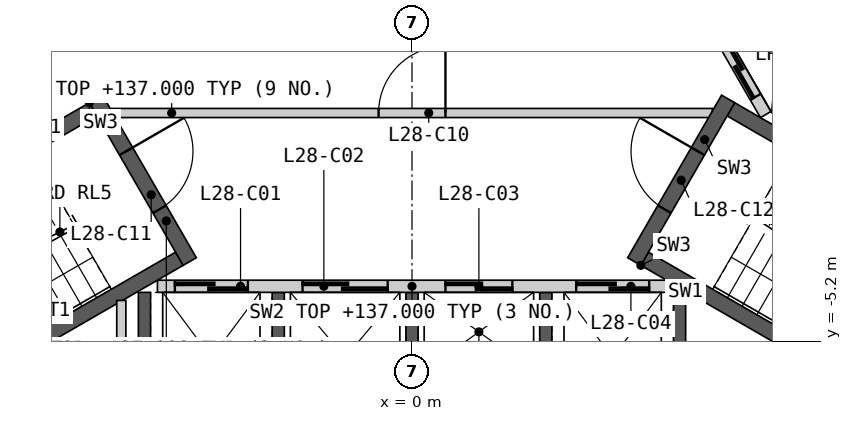
"""IFC4 building model, lengths in metres.
Left out: names, types, materials, properties, quantities, classifications, styles, units other than length and angle.
Written with IfcOpenShell. Run it as: python <this file> out.ifc"""

import sys

from ifc_helpers import new_model, si_unit, direction, frame, frame_2d, origin, place, context, subcontext, project, spatial, polyline, rectangle, outline, extrude, element, fill, save


model = new_model("IFC4")
c1 = context("Model", 3, precision=1e-05, world=origin(), true_north=direction((0.0, 1.0)))
c2 = subcontext(c1, "Body", "Model", "MODEL_VIEW")
j1 = project(units=[si_unit("LENGTHUNIT", "METRE"), si_unit("PLANEANGLEUNIT", "RADIAN")], contexts=[c1])
p1 = place(None, origin())
s1 = spatial("IfcSite", under=j1, at=p1, CompositionType="ELEMENT")
p2 = place(p1, origin())
s2 = spatial("IfcBuilding", under=s1, at=p2, CompositionType="ELEMENT")
p3 = place(p2, frame((0.0, 0.0, 133.2)))
s3 = spatial("IfcBuildingStorey", under=s2, at=p3, CompositionType="ELEMENT", Elevation=133.2)
p4 = place(p3, origin())
e1 = element("IfcWall", 1, at=p4, inside=s3, PredefinedType="SHEAR", context=c2, shape_type="SweptSolid", body=[
    extrude(outline(polyline([(4.5, -4.4), (4.5, -6.906), (-4.5, -6.906), (-4.5, -4.4), (-4.3, -4.4), (-4.3, -6.7), (-2.3, -6.7), (-2.3, -4.4), (-2.1, -4.4), (-2.1, -6.7), (-0.1, -6.7), (-0.1, -4.4), (0.1, -4.4), (0.1, -6.7), (2.1, -6.7), (2.1, -4.4), (2.3, -4.4), (2.3, -6.7), (4.3, -6.7), (4.3, -4.4), (4.5, -4.4)])), origin(), (0.0, 0.0, 1.0), 3.8),
])
p5 = place(p3, frame((-4.187, -4.3, 0.0), z_axis=(0.0, 0.0, 1.0), x_axis=(1.0, 0.0, 0.0)))
e2 = element("IfcWall", 2, at=p5, inside=s3, PredefinedType="SOLIDWALL", context=c2, shape_type="SweptSolid", body=[
    extrude(rectangle(XDim=8.373, YDim=0.2, at=frame_2d((4.187, 0.0))), origin(), (0.0, 0.0, 1.0), 3.8),
])
p6 = place(p5, frame((0.287, 0.0, 0.0)))
e3 = element("IfcOpeningElement", 3, at=p6, cuts=e2, PredefinedType="OPENING", context=c2, shape_type="SweptSolid", body=[
    extrude(rectangle(XDim=1.2, YDim=2.1, at=frame_2d((0.6, 1.05))), frame((0.0, 0.11, 0.0), z_axis=(0.0, -1.0, 0.0), x_axis=(1.0, 0.0, 0.0)), (0.0, 0.0, 1.0), 0.22),
])
p7 = place(p5, frame((2.387, 0.0, 0.0)))
e4 = element("IfcOpeningElement", 4, at=p7, cuts=e2, PredefinedType="OPENING", context=c2, shape_type="SweptSolid", body=[
    extrude(rectangle(XDim=1.4, YDim=2.1, at=frame_2d((0.7, 1.05))), frame((0.0, 0.11, 0.0), z_axis=(0.0, -1.0, 0.0), x_axis=(1.0, 0.0, 0.0)), (0.0, 0.0, 1.0), 0.22),
])
p8 = place(p5, frame((4.737, 0.0, 0.0)))
e5 = element("IfcOpeningElement", 5, at=p8, cuts=e2, PredefinedType="OPENING", context=c2, shape_type="SweptSolid", body=[
    extrude(rectangle(XDim=1.1, YDim=2.1, at=frame_2d((0.55, 1.05))), frame((0.0, 0.11, 0.0), z_axis=(0.0, -1.0, 0.0), x_axis=(1.0, 0.0, 0.0)), (0.0, 0.0, 1.0), 0.22),
])
p9 = place(p5, frame((6.887, 0.0, 0.0)))
e6 = element("IfcOpeningElement", 6, at=p9, cuts=e2, PredefinedType="OPENING", context=c2, shape_type="SweptSolid", body=[
    extrude(rectangle(XDim=1.2, YDim=2.1, at=frame_2d((0.6, 1.05))), frame((0.0, 0.11, 0.0), z_axis=(0.0, -1.0, 0.0), x_axis=(1.0, 0.0, 0.0)), (0.0, 0.0, 1.0), 0.22),
])
p10 = place(p3, origin())
e7 = element("IfcWall", 7, at=p10, inside=s3, PredefinedType="SHEAR", context=c2, shape_type="SweptSolid", body=[
    extrude(outline(polyline([(2.66, 4.192), (4.831, 5.445), (8.231, -0.444), (6.061, -1.697), (5.96, -1.524), (7.952, -0.374), (6.952, 1.358), (4.96, 0.208), (4.861, 0.381), (6.852, 1.531), (5.852, 3.263), (3.861, 2.113), (3.76, 2.287), (5.752, 3.437), (4.752, 5.169), (2.76, 4.019), (2.66, 4.192)])), origin(), (0.0, 0.0, 1.0), 3.8),
])
p11 = place(p3, frame((5.817, -1.476, 0.0), z_axis=(0.0, 0.0, 1.0), x_axis=(-0.500002616675, 0.866023893041, 0.0)))
e8 = element("IfcWall", 8, at=p11, inside=s3, PredefinedType="SOLIDWALL", context=c2, shape_type="SweptSolid", body=[
    extrude(rectangle(XDim=8.373, YDim=0.2, at=frame_2d((4.187, 0.0))), origin(), (0.0, 0.0, 1.0), 3.8),
])
p12 = place(p11, frame((0.337, 0.0, 0.0)))
e9 = element("IfcOpeningElement", 9, at=p12, cuts=e8, PredefinedType="OPENING", context=c2, shape_type="SweptSolid", body=[
    extrude(rectangle(XDim=1.1, YDim=2.1, at=frame_2d((0.55, 1.05))), frame((0.0, 0.11, 0.0), z_axis=(0.0, -1.0, 0.0), x_axis=(1.0, 0.0, 0.0)), (0.0, 0.0, 1.0), 0.22),
])
p13 = place(p11, frame((2.537, 0.0, 0.0)))
e10 = element("IfcOpeningElement", 10, at=p13, cuts=e8, PredefinedType="OPENING", context=c2, shape_type="SweptSolid", body=[
    extrude(rectangle(XDim=1.1, YDim=2.1, at=frame_2d((0.55, 1.05))), frame((0.0, 0.11, 0.0), z_axis=(0.0, -1.0, 0.0), x_axis=(1.0, 0.0, 0.0)), (0.0, 0.0, 1.0), 0.22),
])
p14 = place(p11, frame((4.737, 0.0, 0.0)))
e11 = element("IfcOpeningElement", 11, at=p14, cuts=e8, PredefinedType="OPENING", context=c2, shape_type="SweptSolid", body=[
    extrude(rectangle(XDim=1.1, YDim=2.1, at=frame_2d((0.55, 1.05))), frame((0.0, 0.11, 0.0), z_axis=(0.0, -1.0, 0.0), x_axis=(1.0, 0.0, 0.0)), (0.0, 0.0, 1.0), 0.22),
])
p15 = place(p11, frame((7.037, 0.0, 0.0)))
e12 = element("IfcOpeningElement", 12, at=p15, cuts=e8, PredefinedType="OPENING", context=c2, shape_type="SweptSolid", body=[
    extrude(rectangle(XDim=0.9, YDim=2.1, at=frame_2d((0.45, 1.05))), frame((0.0, 0.11, 0.0), z_axis=(0.0, -1.0, 0.0), x_axis=(1.0, 0.0, 0.0)), (0.0, 0.0, 1.0), 0.22),
])
p16 = place(p3, frame((-4.941, -1.45, 0.0), z_axis=(0.0, 0.0, 1.0), x_axis=(1.0, 0.0, 0.0)))
e13 = element("IfcWall", 13, at=p16, inside=s3, PredefinedType="PARTITIONING", context=c2, shape_type="SweptSolid", body=[
    extrude(rectangle(XDim=9.882, YDim=0.15, at=frame_2d((4.941, 0.0))), origin(), (0.0, 0.0, 1.0), 3.8),
])
p17 = place(p16, frame((4.391, 0.0, 0.0)))
e14 = element("IfcOpeningElement", 14, at=p17, cuts=e13, PredefinedType="OPENING", context=c2, shape_type="SweptSolid", body=[
    extrude(rectangle(XDim=1.1, YDim=2.1, at=frame_2d((0.55, 1.05))), frame((0.0, 0.085, 0.0), z_axis=(0.0, -1.0, 0.0), x_axis=(1.0, 0.0, 0.0)), (0.0, 0.0, 1.0), 0.17),
])
p18 = place(p3, origin())
e15 = element("IfcWall", 15, at=p18, inside=s3, PredefinedType="SHEAR", context=c2, shape_type="SweptSolid", body=[
    extrude(outline(polyline([(-5.307, -1.281), (-10.374, -4.206), (-10.032, -4.298), (-5.182, -1.498), (-5.307, -1.281)])), origin(), (0.0, 0.0, 1.0), 3.8),
])
p19 = place(p3, origin())
e16 = element("IfcWall", 16, at=p19, inside=s3, PredefinedType="SHEAR", context=c2, shape_type="SweptSolid", body=[
    extrude(outline(polyline([(-8.738, -6.539), (-8.83, -6.881), (-3.763, -3.956), (-3.888, -3.739), (-8.738, -6.539)])), origin(), (0.0, 0.0, 1.0), 3.8),
])
p20 = place(p3, frame((-5.199, -1.219, 0.0), z_axis=(0.0, 0.0, 1.0), x_axis=(0.499982516597, -0.866035497597, 0.0)))
e17 = element("IfcWall", 17, at=p20, inside=s3, PredefinedType="SHEAR", context=c2, shape_type="SweptSolid", body=[
    extrude(rectangle(XDim=3.088, YDim=0.25, at=frame_2d((1.544, 0.0))), origin(), (0.0, 0.0, 1.0), 3.8),
])
p21 = place(p20, frame((0.994, 0.0, 0.0)))
e18 = element("IfcOpeningElement", 18, at=p21, cuts=e17, PredefinedType="OPENING", context=c2, shape_type="SweptSolid", body=[
    extrude(rectangle(XDim=1.1, YDim=2.1, at=frame_2d((0.55, 1.05))), frame((0.0, 0.135, 0.0), z_axis=(0.0, -1.0, 0.0), x_axis=(1.0, 0.0, 0.0)), (0.0, 0.0, 1.0), 0.27),
])
p22 = place(p3, origin())
e19 = element("IfcWall", 19, at=p22, inside=s3, PredefinedType="SHEAR", context=c2, shape_type="SweptSolid", body=[
    extrude(outline(polyline([(3.763, -3.956), (8.83, -6.881), (8.738, -6.539), (3.888, -3.739), (3.763, -3.956)])), origin(), (0.0, 0.0, 1.0), 3.8),
])
p23 = place(p3, origin())
e20 = element("IfcWall", 20, at=p23, inside=s3, PredefinedType="SHEAR", context=c2, shape_type="SweptSolid", body=[
    extrude(outline(polyline([(10.032, -4.298), (10.374, -4.206), (5.307, -1.281), (5.182, -1.498), (10.032, -4.298)])), origin(), (0.0, 0.0, 1.0), 3.8),
])
p24 = place(p3, frame((3.655, -3.893, 0.0), z_axis=(0.0, 0.0, 1.0), x_axis=(0.499982516597, 0.866035497597, 0.0)))
e21 = element("IfcWall", 21, at=p24, inside=s3, PredefinedType="SHEAR", context=c2, shape_type="SweptSolid", body=[
    extrude(rectangle(XDim=3.088, YDim=0.25, at=frame_2d((1.544, 0.0))), origin(), (0.0, 0.0, 1.0), 3.8),
])
p25 = place(p24, frame((0.994, 0.0, 0.0)))
e22 = element("IfcOpeningElement", 22, at=p25, cuts=e21, PredefinedType="OPENING", context=c2, shape_type="SweptSolid", body=[
    extrude(rectangle(XDim=1.1, YDim=2.1, at=frame_2d((0.55, 1.05))), frame((0.0, 0.135, 0.0), z_axis=(0.0, -1.0, 0.0), x_axis=(1.0, 0.0, 0.0)), (0.0, 0.0, 1.0), 0.27),
])
p26 = place(p3, frame((-4.781, -8.626, 0.0), z_axis=(0.0, 0.0, 1.0), x_axis=(0.0, 1.0, 0.0)))
e23 = element("IfcWall", 23, at=p26, inside=s3, PredefinedType="PARTITIONING", context=c2, shape_type="SweptSolid", body=[
    extrude(rectangle(XDim=4.093, YDim=0.15, at=frame_2d((2.047, 0.0))), origin(), (0.0, 0.0, 1.0), 3.8),
])
p27 = place(p6, origin())
e24 = element("IfcDoor", 24, at=p27, inside=s3, OperationType="SLIDING_TO_LEFT", PredefinedType="DOOR", context=c2, shape_type="SweptSolid", body=[
    extrude(rectangle(XDim=1.2, YDim=2.1, at=frame_2d((0.6, 1.05))), frame((0.0, 0.025, 0.0), z_axis=(0.0, -1.0, 0.0), x_axis=(1.0, 0.0, 0.0)), (0.0, 0.0, 1.0), 0.05),
])
fill(e3, e24)
p28 = place(p7, origin())
e25 = element("IfcDoor", 25, at=p28, inside=s3, OperationType="SLIDING_TO_LEFT", PredefinedType="DOOR", context=c2, shape_type="SweptSolid", body=[
    extrude(rectangle(XDim=1.4, YDim=2.1, at=frame_2d((0.7, 1.05))), frame((0.0, 0.025, 0.0), z_axis=(0.0, -1.0, 0.0), x_axis=(1.0, 0.0, 0.0)), (0.0, 0.0, 1.0), 0.05),
])
fill(e4, e25)
p29 = place(p8, origin())
e26 = element("IfcDoor", 26, at=p29, inside=s3, OperationType="SLIDING_TO_LEFT", PredefinedType="DOOR", context=c2, shape_type="SweptSolid", body=[
    extrude(rectangle(XDim=1.1, YDim=2.1, at=frame_2d((0.55, 1.05))), frame((0.0, 0.025, 0.0), z_axis=(0.0, -1.0, 0.0), x_axis=(1.0, 0.0, 0.0)), (0.0, 0.0, 1.0), 0.05),
])
fill(e5, e26)
p30 = place(p9, origin())
e27 = element("IfcDoor", 27, at=p30, inside=s3, OperationType="SLIDING_TO_LEFT", PredefinedType="DOOR", context=c2, shape_type="SweptSolid", body=[
    extrude(rectangle(XDim=1.2, YDim=2.1, at=frame_2d((0.6, 1.05))), frame((0.0, 0.025, 0.0), z_axis=(0.0, -1.0, 0.0), x_axis=(1.0, 0.0, 0.0)), (0.0, 0.0, 1.0), 0.05),
])
fill(e6, e27)
p31 = place(p12, origin())
e28 = element("IfcDoor", 28, at=p31, inside=s3, OperationType="SLIDING_TO_LEFT", PredefinedType="DOOR", context=c2, shape_type="SweptSolid", body=[
    extrude(rectangle(XDim=1.1, YDim=2.1, at=frame_2d((0.55, 1.05))), frame((0.0, 0.025, 0.0), z_axis=(0.0, -1.0, 0.0), x_axis=(1.0, 0.0, 0.0)), (0.0, 0.0, 1.0), 0.05),
])
fill(e9, e28)
p32 = place(p17, origin())
e29 = element("IfcDoor", 29, at=p32, inside=s3, OperationType="SINGLE_SWING_RIGHT", PredefinedType="DOOR", context=c2, shape_type="SweptSolid", body=[
    extrude(rectangle(XDim=1.1, YDim=2.1, at=frame_2d((0.55, 1.05))), frame((0.0, 0.025, 0.0), z_axis=(0.0, -1.0, 0.0), x_axis=(1.0, 0.0, 0.0)), (0.0, 0.0, 1.0), 0.05),
])
fill(e14, e29)
p33 = place(p21, origin())
e30 = element("IfcDoor", 30, at=p33, inside=s3, OperationType="SINGLE_SWING_LEFT", PredefinedType="DOOR", context=c2, shape_type="SweptSolid", body=[
    extrude(rectangle(XDim=1.1, YDim=2.1, at=frame_2d((0.55, 1.05))), frame((0.0, 0.025, 0.0), z_axis=(0.0, -1.0, 0.0), x_axis=(1.0, 0.0, 0.0)), (0.0, 0.0, 1.0), 0.05),
])
fill(e18, e30)
p34 = place(p25, origin())
e31 = element("IfcDoor", 31, at=p34, inside=s3, OperationType="SINGLE_SWING_RIGHT", PredefinedType="DOOR", context=c2, shape_type="SweptSolid", body=[
    extrude(rectangle(XDim=1.1, YDim=2.1, at=frame_2d((0.55, 1.05))), frame((0.0, 0.025, 0.0), z_axis=(0.0, -1.0, 0.0), x_axis=(1.0, 0.0, 0.0)), (0.0, 0.0, 1.0), 0.05),
])
fill(e22, e31)
save(model, sys.argv[1])
